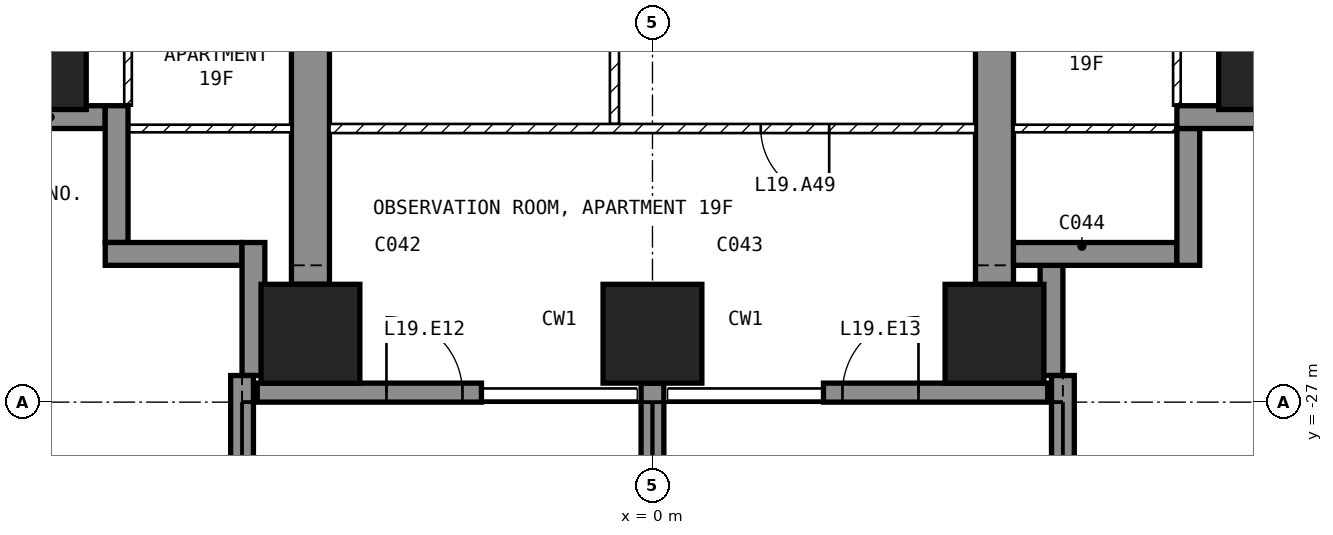
"""IFC4 building model, lengths in metres.
Left out: names, types, materials, properties, quantities, classifications, styles, units other than length and angle.
Written with IfcOpenShell. Run it as: python <this file> out.ifc"""

import sys

from ifc_helpers import new_model, si_unit, direction, frame, frame_2d, origin, origin_2d, place, context, subcontext, project, spatial, polyline, rectangle, outline, extrude, element, fill, save


model = new_model("IFC4")
c1 = context("Model", 3, precision=1e-05, world=origin(), true_north=direction((0.0, 1.0)))
c2 = subcontext(c1, "Body", "Model", "MODEL_VIEW")
j1 = project(units=[si_unit("LENGTHUNIT", "METRE"), si_unit("PLANEANGLEUNIT", "RADIAN")], contexts=[c1])
p1 = place(None, origin())
s1 = spatial("IfcSite", under=j1, at=p1, CompositionType="ELEMENT")
p2 = place(p1, origin())
s2 = spatial("IfcBuilding", under=s1, at=p2, CompositionType="ELEMENT")
p3 = place(p2, frame((0.0, 0.0, 85.5)))
s3 = spatial("IfcBuildingStorey", under=s2, at=p3, CompositionType="ELEMENT", Elevation=85.5)
for number, where, z_axis, x_axis in (
    (1, (-8.1, -22.5, -0.25), (0.0, 0.0, 1.0), (1.0, 0.0, 0.0)),
    (2, (-4.5, -26.1, -0.25), (0.0, 0.0, 1.0), (1.0, 0.0, 0.0)),
    (3, (0.0, -26.1, -0.25), (0.0, 0.0, 1.0), (1.0, 0.0, 0.0)),
    (4, (4.5, -26.1, -0.25), (0.0, 0.0, 1.0), (1.0, 0.0, 0.0)),
    (5, (8.1, -22.5, -0.25), (0.0, 0.0, 1.0), (1.0, 0.0, 0.0)),
):
    element("IfcColumn", number, at=place(p3, frame(where, z_axis=z_axis, x_axis=x_axis)), inside=s3, PredefinedType="COLUMN", context=c2, shape_type="SweptSolid", body=[
        extrude(rectangle(XDim=1.3, YDim=1.3, at=origin_2d()), origin(), (0.0, 0.0, 1.0), 3.5),
    ])
for number, where, z_axis, x_axis in (
    (6, (-4.75, -25.45, -0.25), (1.0, 0.0, 0.0), (0.0, 1.0, 0.0)),
    (7, (4.25, -25.45, -0.25), (1.0, 0.0, 0.0), (0.0, 1.0, 0.0)),
):
    element("IfcWall", number, at=place(p3, frame(where, z_axis=z_axis, x_axis=x_axis)), inside=s3, PredefinedType="SHEAR", context=c2, shape_type="SweptSolid", body=[
        extrude(outline(polyline([(0.0, 0.0), (4.15, 0.0), (4.15, 2.65), (6.55, 2.65), (6.55, 0.0), (11.95, 0.0), (11.95, 2.65), (14.35, 2.65), (14.35, 0.0), (16.45, 0.0), (16.45, 3.5), (0.0, 3.5), (0.0, 0.0)])), origin(), (0.0, 0.0, 1.0), 0.5),
    ])
p4 = place(p3, frame((-5.2, -26.875, 0.0), z_axis=(0.0, 0.0, 1.0), x_axis=(1.0, 0.0, 0.0)))
e8 = element("IfcWall", 8, at=p4, inside=s3, PredefinedType="SOLIDWALL", context=c2, shape_type="SweptSolid", body=[
    extrude(rectangle(XDim=2.95, YDim=0.25, at=frame_2d((1.475, 0.0))), origin(), (0.0, 0.0, 1.0), 3.25),
])
p5 = place(p4, frame((1.7, 0.0, 0.0)))
e9 = element("IfcOpeningElement", 9, at=p5, cuts=e8, PredefinedType="OPENING", context=c2, shape_type="SweptSolid", body=[
    extrude(rectangle(XDim=1.0, YDim=2.4, at=frame_2d((0.5, 1.2))), frame((0.0, 0.135, 0.0), z_axis=(0.0, -1.0, 0.0), x_axis=(1.0, 0.0, 0.0)), (0.0, 0.0, 1.0), 0.27),
])
p6 = place(p3, frame((2.25, -26.875, 0.0), z_axis=(0.0, 0.0, 1.0), x_axis=(1.0, 0.0, 0.0)))
e10 = element("IfcWall", 10, at=p6, inside=s3, PredefinedType="SOLIDWALL", context=c2, shape_type="SweptSolid", body=[
    extrude(rectangle(XDim=2.95, YDim=0.25, at=frame_2d((1.475, 0.0))), origin(), (0.0, 0.0, 1.0), 3.25),
])
p7 = place(p6, frame((0.25, 0.0, 0.0)))
e11 = element("IfcOpeningElement", 11, at=p7, cuts=e10, PredefinedType="OPENING", context=c2, shape_type="SweptSolid", body=[
    extrude(rectangle(XDim=1.0, YDim=2.4, at=frame_2d((0.5, 1.2))), frame((0.0, 0.135, 0.0), z_axis=(0.0, -1.0, 0.0), x_axis=(1.0, 0.0, 0.0)), (0.0, 0.0, 1.0), 0.27),
])
p8 = place(p3, frame((5.25, -26.65, 0.0), z_axis=(0.0, 0.0, 1.0), x_axis=(0.0, 1.0, 0.0)))
e12 = element("IfcWall", 12, at=p8, inside=s3, PredefinedType="SOLIDWALL", context=c2, shape_type="SweptSolid", body=[
    extrude(rectangle(XDim=1.45, YDim=0.3, at=frame_2d((0.725, 0.0))), origin(), (0.0, 0.0, 1.0), 3.25),
])
p9 = place(p3, frame((4.75, -25.05, 0.0), z_axis=(0.0, 0.0, 1.0), x_axis=(1.0, 0.0, 0.0)))
e13 = element("IfcWall", 13, at=p9, inside=s3, PredefinedType="SOLIDWALL", context=c2, shape_type="SweptSolid", body=[
    extrude(rectangle(XDim=2.15, YDim=0.3, at=frame_2d((1.075, 0.0))), origin(), (0.0, 0.0, 1.0), 3.25),
])
p10 = place(p3, frame((7.05, -25.2, 0.0), z_axis=(0.0, 0.0, 1.0), x_axis=(0.0, 1.0, 0.0)))
e14 = element("IfcWall", 14, at=p10, inside=s3, PredefinedType="SOLIDWALL", context=c2, shape_type="SweptSolid", body=[
    extrude(rectangle(XDim=1.8, YDim=0.3, at=frame_2d((0.9, 0.0))), origin(), (0.0, 0.0, 1.0), 3.25),
])
p11 = place(p3, frame((6.9, -23.25, 0.0), z_axis=(0.0, 0.0, 1.0), x_axis=(1.0, 0.0, 0.0)))
e15 = element("IfcWall", 15, at=p11, inside=s3, PredefinedType="SOLIDWALL", context=c2, shape_type="SweptSolid", body=[
    extrude(rectangle(XDim=1.75, YDim=0.3, at=frame_2d((0.875, 0.0))), origin(), (0.0, 0.0, 1.0), 3.25),
])
p12 = place(p3, frame((-8.65, -23.25, 0.0), z_axis=(0.0, 0.0, 1.0), x_axis=(1.0, 0.0, 0.0)))
e16 = element("IfcWall", 16, at=p12, inside=s3, PredefinedType="SOLIDWALL", context=c2, shape_type="SweptSolid", body=[
    extrude(rectangle(XDim=1.45, YDim=0.3, at=frame_2d((0.725, 0.0))), origin(), (0.0, 0.0, 1.0), 3.25),
])
p13 = place(p3, frame((-7.05, -23.1, 0.0), z_axis=(0.0, 0.0, 1.0), x_axis=(0.0, -1.0, 0.0)))
e17 = element("IfcWall", 17, at=p13, inside=s3, PredefinedType="SOLIDWALL", context=c2, shape_type="SweptSolid", body=[
    extrude(rectangle(XDim=1.8, YDim=0.3, at=frame_2d((0.9, 0.0))), origin(), (0.0, 0.0, 1.0), 3.25),
])
p14 = place(p3, frame((-7.2, -25.05, 0.0), z_axis=(0.0, 0.0, 1.0), x_axis=(1.0, 0.0, 0.0)))
e18 = element("IfcWall", 18, at=p14, inside=s3, PredefinedType="SOLIDWALL", context=c2, shape_type="SweptSolid", body=[
    extrude(rectangle(XDim=1.8, YDim=0.3, at=frame_2d((0.9, 0.0))), origin(), (0.0, 0.0, 1.0), 3.25),
])
p15 = place(p3, frame((-5.25, -24.9, 0.0), z_axis=(0.0, 0.0, 1.0), x_axis=(0.0, -1.0, 0.0)))
e19 = element("IfcWall", 19, at=p15, inside=s3, PredefinedType="SOLIDWALL", context=c2, shape_type="SweptSolid", body=[
    extrude(rectangle(XDim=1.75, YDim=0.3, at=frame_2d((0.875, 0.0))), origin(), (0.0, 0.0, 1.0), 3.25),
])
p16 = place(p3, frame((-5.4, -26.65, 0.0), z_axis=(0.0, 0.0, 1.0), x_axis=(0.0, -1.0, 0.0)))
e20 = element("IfcWall", 20, at=p16, inside=s3, PredefinedType="SOLIDWALL", context=c2, shape_type="SweptSolid", body=[
    extrude(rectangle(XDim=3.05, YDim=0.3, at=frame_2d((1.525, 0.0))), origin(), (0.0, 0.0, 1.0), 3.25),
])
p17 = place(p3, frame((0.0, -26.75, 0.0), z_axis=(0.0, 0.0, 1.0), x_axis=(0.0, -1.0, 0.0)))
e21 = element("IfcWall", 21, at=p17, inside=s3, PredefinedType="SOLIDWALL", context=c2, shape_type="SweptSolid", body=[
    extrude(rectangle(XDim=2.95, YDim=0.3, at=frame_2d((1.475, 0.0))), origin(), (0.0, 0.0, 1.0), 3.25),
])
p18 = place(p3, frame((5.4, -26.65, 0.0), z_axis=(0.0, 0.0, 1.0), x_axis=(0.0, -1.0, 0.0)))
e22 = element("IfcWall", 22, at=p18, inside=s3, PredefinedType="SOLIDWALL", context=c2, shape_type="SweptSolid", body=[
    extrude(rectangle(XDim=3.05, YDim=0.3, at=frame_2d((1.525, 0.0))), origin(), (0.0, 0.0, 1.0), 3.25),
])
p19 = place(p3, frame((-0.5, -23.34, 0.0), z_axis=(0.0, 0.0, 1.0), x_axis=(0.0, 1.0, 0.0)))
e23 = element("IfcWall", 23, at=p19, inside=s3, PredefinedType="PARTITIONING", context=c2, shape_type="SweptSolid", body=[
    extrude(rectangle(XDim=4.38, YDim=0.12, at=frame_2d((2.19, 0.0))), origin(), (0.0, 0.0, 1.0), 3.25),
])
p20 = place(p19, frame((1.74, 0.0, 0.0)))
e24 = element("IfcOpeningElement", 24, at=p20, cuts=e23, PredefinedType="OPENING", context=c2, shape_type="SweptSolid", body=[
    extrude(rectangle(XDim=0.9, YDim=2.1, at=frame_2d((0.45, 1.05))), frame((0.0, 0.07, 0.0), z_axis=(0.0, -1.0, 0.0), x_axis=(1.0, 0.0, 0.0)), (0.0, 0.0, 1.0), 0.14),
])
p21 = place(p3, frame((4.25, -23.4, 0.0), z_axis=(0.0, 0.0, 1.0), x_axis=(-1.0, 0.0, 0.0)))
e25 = element("IfcWall", 25, at=p21, inside=s3, PredefinedType="PARTITIONING", context=c2, shape_type="SweptSolid", body=[
    extrude(rectangle(XDim=8.5, YDim=0.12, at=frame_2d((4.25, 0.0))), origin(), (0.0, 0.0, 1.0), 3.25),
])
p22 = place(p21, frame((1.925, 0.0, 0.0)))
e26 = element("IfcOpeningElement", 26, at=p22, cuts=e25, PredefinedType="OPENING", context=c2, shape_type="SweptSolid", body=[
    extrude(rectangle(XDim=0.9, YDim=2.1, at=frame_2d((0.45, 1.05))), frame((0.0, 0.07, 0.0), z_axis=(0.0, -1.0, 0.0), x_axis=(1.0, 0.0, 0.0)), (0.0, 0.0, 1.0), 0.14),
])
p23 = place(p3, frame((6.9, -23.1, 0.0), z_axis=(0.0, 0.0, 1.0), x_axis=(0.0, 1.0, 0.0)))
e27 = element("IfcWall", 27, at=p23, inside=s3, PredefinedType="PARTITIONING", context=c2, shape_type="SweptSolid", body=[
    extrude(rectangle(XDim=2.65, YDim=0.1, at=frame_2d((1.325, 0.0))), origin(), (0.0, 0.0, 1.0), 3.25),
])
p24 = place(p3, frame((7.12, -23.4, 0.0), z_axis=(0.0, 0.0, 1.0), x_axis=(-1.0, 0.0, 0.0)))
e28 = element("IfcWall", 28, at=p24, inside=s3, PredefinedType="PARTITIONING", context=c2, shape_type="SweptSolid", body=[
    extrude(rectangle(XDim=2.37, YDim=0.1, at=frame_2d((1.185, 0.0))), origin(), (0.0, 0.0, 1.0), 3.25),
])
p25 = place(p3, frame((-6.9, -20.45, 0.0), z_axis=(0.0, 0.0, 1.0), x_axis=(0.0, -1.0, 0.0)))
e29 = element("IfcWall", 29, at=p25, inside=s3, PredefinedType="PARTITIONING", context=c2, shape_type="SweptSolid", body=[
    extrude(rectangle(XDim=2.65, YDim=0.1, at=frame_2d((1.325, 0.0))), origin(), (0.0, 0.0, 1.0), 3.25),
])
p26 = place(p3, frame((-4.75, -23.4, 0.0), z_axis=(0.0, 0.0, 1.0), x_axis=(-1.0, 0.0, 0.0)))
e30 = element("IfcWall", 30, at=p26, inside=s3, PredefinedType="PARTITIONING", context=c2, shape_type="SweptSolid", body=[
    extrude(rectangle(XDim=2.37, YDim=0.1, at=frame_2d((1.185, 0.0))), origin(), (0.0, 0.0, 1.0), 3.25),
])
p27 = place(p5, origin())
e31 = element("IfcDoor", 31, at=p27, inside=s3, OperationType="SINGLE_SWING_LEFT", PredefinedType="DOOR", context=c2, shape_type="SweptSolid", body=[
    extrude(rectangle(XDim=1.0, YDim=2.4, at=frame_2d((0.5, 1.2))), frame((0.0, 0.025, 0.0), z_axis=(0.0, -1.0, 0.0), x_axis=(1.0, 0.0, 0.0)), (0.0, 0.0, 1.0), 0.05),
])
fill(e9, e31)
p28 = place(p7, origin())
e32 = element("IfcDoor", 32, at=p28, inside=s3, OperationType="SINGLE_SWING_RIGHT", PredefinedType="DOOR", context=c2, shape_type="SweptSolid", body=[
    extrude(rectangle(XDim=1.0, YDim=2.4, at=frame_2d((0.5, 1.2))), frame((0.0, 0.025, 0.0), z_axis=(0.0, -1.0, 0.0), x_axis=(1.0, 0.0, 0.0)), (0.0, 0.0, 1.0), 0.05),
])
fill(e11, e32)
p29 = place(p22, origin())
e33 = element("IfcDoor", 33, at=p29, inside=s3, OperationType="SINGLE_SWING_LEFT", PredefinedType="DOOR", context=c2, shape_type="SweptSolid", body=[
    extrude(rectangle(XDim=0.9, YDim=2.1, at=frame_2d((0.45, 1.05))), frame((0.0, 0.025, 0.0), z_axis=(0.0, -1.0, 0.0), x_axis=(1.0, 0.0, 0.0)), (0.0, 0.0, 1.0), 0.05),
])
fill(e26, e33)
save(model, sys.argv[1])
